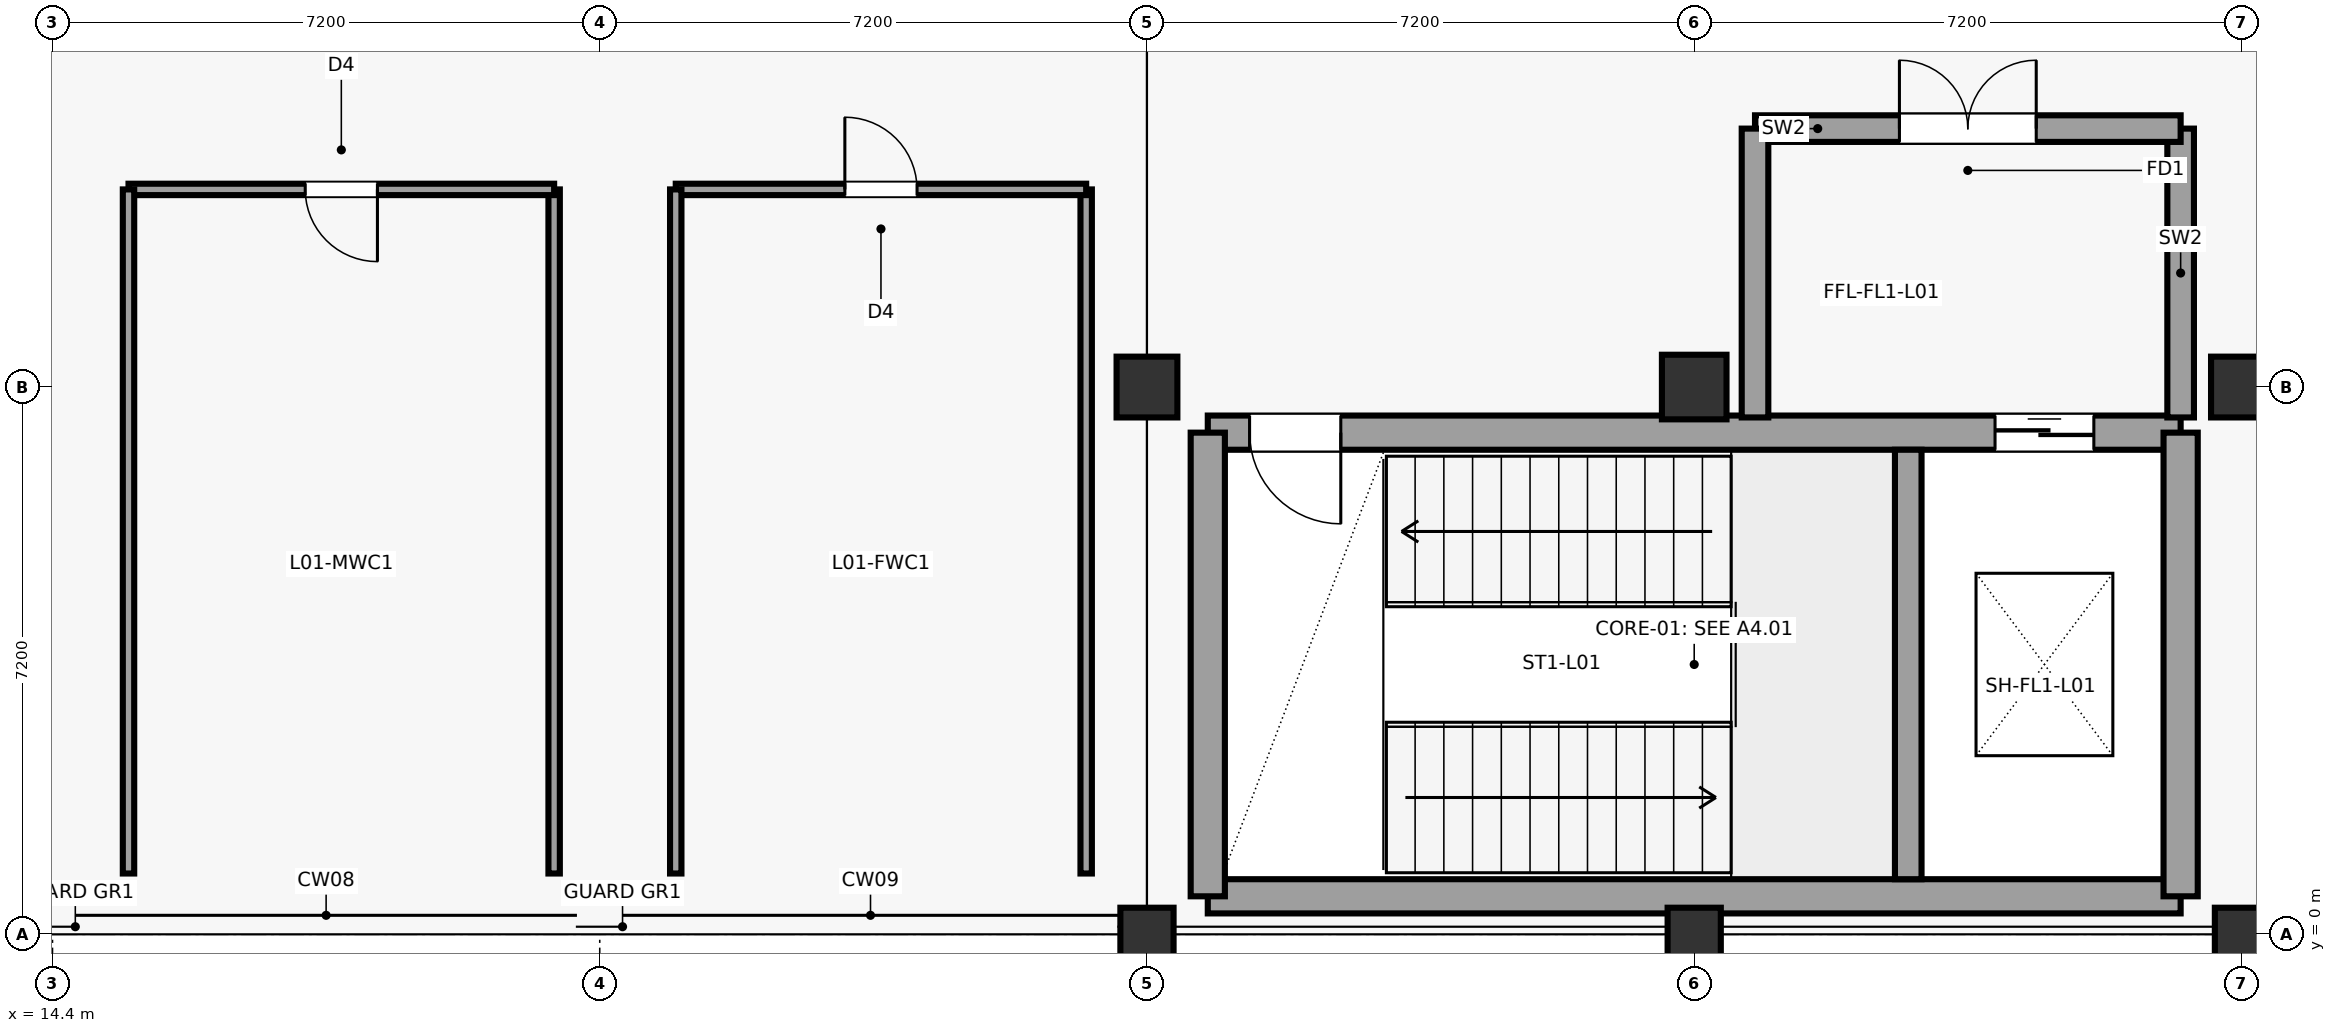
"""IFC4 building model, lengths in metres.
Left out: names, types, materials, properties, quantities, classifications, styles, units other than length and angle.
Written with IfcOpenShell. Run it as: python <this file> out.ifc"""

import sys

from ifc_helpers import new_model, si_unit, direction, frame, frame_2d, origin, origin_2d, place, context, subcontext, project, spatial, rectangle, circle, extrude, element, fill, save


model = new_model("IFC4")
c1 = context("Model", 3, precision=1e-05, world=origin(), true_north=direction((0.0, 1.0)))
c2 = subcontext(c1, "Body", "Model", "MODEL_VIEW")
j1 = project(units=[si_unit("LENGTHUNIT", "METRE"), si_unit("PLANEANGLEUNIT", "RADIAN")], contexts=[c1])
p1 = place(None, origin())
s1 = spatial("IfcSite", under=j1, at=p1, CompositionType="ELEMENT")
p2 = place(p1, origin())
s2 = spatial("IfcBuilding", under=s1, at=p2, CompositionType="ELEMENT")
p3 = place(p2, frame((0.0, 0.0, 5.4)))
s3 = spatial("IfcBuildingStorey", under=s2, at=p3, CompositionType="ELEMENT", Elevation=5.4)
p4 = place(p3, frame((28.8, 0.0, 0.0), z_axis=(0.0, 0.0, 1.0), x_axis=(1.0, 0.0, 0.0)))
e1 = element("IfcColumn", 1, at=p4, inside=s3, PredefinedType="COLUMN", context=c2, shape_type="SweptSolid", body=[
    extrude(rectangle(XDim=0.7, YDim=0.7, at=origin_2d()), origin(), (0.0, 0.0, 1.0), 4.2),
])
p5 = place(p3, frame((28.8, 7.2, 0.0), z_axis=(0.0, 0.0, 1.0), x_axis=(1.0, 0.0, 0.0)))
e2 = element("IfcColumn", 2, at=p5, inside=s3, PredefinedType="COLUMN", context=c2, shape_type="SweptSolid", body=[
    extrude(rectangle(XDim=0.8, YDim=0.8, at=origin_2d()), origin(), (0.0, 0.0, 1.0), 4.2),
])
p6 = place(p3, frame((36.0, 0.0, 0.0), z_axis=(0.0, 0.0, 1.0), x_axis=(1.0, 0.0, 0.0)))
e3 = element("IfcColumn", 3, at=p6, inside=s3, PredefinedType="COLUMN", context=c2, shape_type="SweptSolid", body=[
    extrude(rectangle(XDim=0.7, YDim=0.7, at=origin_2d()), origin(), (0.0, 0.0, 1.0), 4.2),
])
p7 = place(p3, frame((36.0, 7.2, 0.0), z_axis=(0.0, 0.0, 1.0), x_axis=(1.0, 0.0, 0.0)))
e4 = element("IfcColumn", 4, at=p7, inside=s3, PredefinedType="COLUMN", context=c2, shape_type="SweptSolid", body=[
    extrude(rectangle(XDim=0.85, YDim=0.85, at=origin_2d()), origin(), (0.0, 0.0, 1.0), 4.2),
])
p8 = place(p3, frame((43.2, 0.0, 0.0), z_axis=(0.0, 0.0, 1.0), x_axis=(1.0, 0.0, 0.0)))
e5 = element("IfcColumn", 5, at=p8, inside=s3, PredefinedType="COLUMN", context=c2, shape_type="SweptSolid", body=[
    extrude(rectangle(XDim=0.7, YDim=0.7, at=origin_2d()), origin(), (0.0, 0.0, 1.0), 4.2),
])
p9 = place(p3, frame((43.2, 7.2, 0.0), z_axis=(0.0, 0.0, 1.0), x_axis=(1.0, 0.0, 0.0)))
e6 = element("IfcColumn", 6, at=p9, inside=s3, PredefinedType="COLUMN", context=c2, shape_type="SweptSolid", body=[
    extrude(circle(Radius=0.4, at=origin_2d()), origin(), (0.0, 0.0, 1.0), 4.2),
])
p10 = place(p3, frame((29.6, 0.5, 0.0), z_axis=(0.0, 0.0, 1.0), x_axis=(1.0, 0.0, 0.0)))
e7 = element("IfcWall", 7, at=p10, inside=s3, PredefinedType="SHEAR", context=c2, shape_type="SweptSolid", body=[
    extrude(rectangle(XDim=12.8, YDim=0.45, at=frame_2d((6.4, 0.0))), origin(), (0.0, 0.0, 1.0), 3.92),
])
p11 = place(p3, frame((29.6, 6.6, 0.0), z_axis=(0.0, 0.0, 1.0), x_axis=(1.0, 0.0, 0.0)))
e8 = element("IfcWall", 8, at=p11, inside=s3, PredefinedType="SHEAR", context=c2, shape_type="SweptSolid", body=[
    extrude(rectangle(XDim=12.8, YDim=0.45, at=frame_2d((6.4, 0.0))), origin(), (0.0, 0.0, 1.0), 3.92),
])
p12 = place(p11, frame((0.55, 0.0, 0.0)))
e9 = element("IfcOpeningElement", 9, at=p12, cuts=e8, PredefinedType="OPENING", context=c2, shape_type="SweptSolid", body=[
    extrude(rectangle(XDim=1.2, YDim=2.25, at=frame_2d((0.6, 1.125))), frame((0.0, 0.235, 0.0), z_axis=(0.0, -1.0, 0.0), x_axis=(1.0, 0.0, 0.0)), (0.0, 0.0, 1.0), 0.47),
])
p13 = place(p11, frame((10.358, 0.0, 0.0)))
e10 = element("IfcOpeningElement", 10, at=p13, cuts=e8, PredefinedType="OPENING", context=c2, shape_type="SweptSolid", body=[
    extrude(rectangle(XDim=1.3, YDim=2.25, at=frame_2d((0.65, 1.125))), frame((0.0, 0.235, 0.0), z_axis=(0.0, -1.0, 0.0), x_axis=(1.0, 0.0, 0.0)), (0.0, 0.0, 1.0), 0.47),
])
for number, where, z_axis, x_axis in (
    (11, (29.6, 0.5, 0.0), (0.0, 0.0, 1.0), (0.0, 1.0, 0.0)),
    (12, (42.4, 0.5, 0.0), (0.0, 0.0, 1.0), (0.0, 1.0, 0.0)),
):
    element("IfcWall", number, at=place(p3, frame(where, z_axis=z_axis, x_axis=x_axis)), inside=s3, PredefinedType="SHEAR", context=c2, shape_type="SweptSolid", body=[
        extrude(rectangle(XDim=6.1, YDim=0.45, at=frame_2d((3.05, 0.0))), origin(), (0.0, 0.0, 1.0), 3.92),
    ])
p14 = place(p3, frame((38.816, 0.725, 0.0), z_axis=(0.0, 0.0, 1.0), x_axis=(0.0, 1.0, 0.0)))
e13 = element("IfcWall", 13, at=p14, inside=s3, PredefinedType="SHEAR", context=c2, shape_type="SweptSolid", body=[
    extrude(rectangle(XDim=5.65, YDim=0.35, at=frame_2d((2.825, 0.0))), origin(), (0.0, 0.0, 1.0), 3.92),
])
p15 = place(p3, frame((42.4, 6.8, 0.0), z_axis=(0.0, 0.0, 1.0), x_axis=(0.0, 1.0, 0.0)))
e14 = element("IfcWall", 14, at=p15, inside=s3, PredefinedType="SHEAR", context=c2, shape_type="SweptSolid", body=[
    extrude(rectangle(XDim=3.8, YDim=0.35, at=frame_2d((1.9, 0.0))), origin(), (0.0, 0.0, 1.0), 2.98),
])
p16 = place(p3, frame((42.4, 10.6, 0.0), z_axis=(0.0, 0.0, 1.0), x_axis=(-1.0, 0.0, 0.0)))
e15 = element("IfcWall", 15, at=p16, inside=s3, PredefinedType="SHEAR", context=c2, shape_type="SweptSolid", body=[
    extrude(rectangle(XDim=5.6, YDim=0.35, at=frame_2d((2.8, 0.0))), origin(), (0.0, 0.0, 1.0), 2.98),
])
p17 = place(p16, frame((1.9, 0.0, 0.0)))
e16 = element("IfcOpeningElement", 16, at=p17, cuts=e15, PredefinedType="OPENING", context=c2, shape_type="SweptSolid", body=[
    extrude(rectangle(XDim=1.8, YDim=2.3, at=frame_2d((0.9, 1.15))), frame((0.0, 0.185, 0.0), z_axis=(0.0, -1.0, 0.0), x_axis=(1.0, 0.0, 0.0)), (0.0, 0.0, 1.0), 0.37),
])
p18 = place(p3, frame((36.8, 10.6, 0.0), z_axis=(0.0, 0.0, 1.0), x_axis=(0.0, -1.0, 0.0)))
e17 = element("IfcWall", 17, at=p18, inside=s3, PredefinedType="SHEAR", context=c2, shape_type="SweptSolid", body=[
    extrude(rectangle(XDim=3.8, YDim=0.35, at=frame_2d((1.9, 0.0))), origin(), (0.0, 0.0, 1.0), 2.98),
])
p19 = place(p3, frame((21.0, 0.8, 0.0), z_axis=(0.0, 0.0, 1.0), x_axis=(0.0, 1.0, 0.0)))
e18 = element("IfcWall", 18, at=p19, inside=s3, PredefinedType="PARTITIONING", context=c2, shape_type="SweptSolid", body=[
    extrude(rectangle(XDim=9.0, YDim=0.15, at=frame_2d((4.5, 0.0))), origin(), (0.0, 0.0, 1.0), 2.98),
])
p20 = place(p3, frame((21.0, 9.8, 0.0), z_axis=(0.0, 0.0, 1.0), x_axis=(-1.0, 0.0, 0.0)))
e19 = element("IfcWall", 19, at=p20, inside=s3, PredefinedType="PARTITIONING", context=c2, shape_type="SweptSolid", body=[
    extrude(rectangle(XDim=5.6, YDim=0.15, at=frame_2d((2.8, 0.0))), origin(), (0.0, 0.0, 1.0), 2.98),
])
p21 = place(p20, frame((2.325, 0.0, 0.0)))
e20 = element("IfcOpeningElement", 20, at=p21, cuts=e19, PredefinedType="OPENING", context=c2, shape_type="SweptSolid", body=[
    extrude(rectangle(XDim=0.95, YDim=2.15, at=frame_2d((0.475, 1.075))), frame((0.0, 0.085, 0.0), z_axis=(0.0, -1.0, 0.0), x_axis=(1.0, 0.0, 0.0)), (0.0, 0.0, 1.0), 0.17),
])
for number, where, z_axis, x_axis in (
    (21, (15.4, 9.8, 0.0), (0.0, 0.0, 1.0), (0.0, -1.0, 0.0)),
    (22, (28.0, 0.8, 0.0), (0.0, 0.0, 1.0), (0.0, 1.0, 0.0)),
):
    element("IfcWall", number, at=place(p3, frame(where, z_axis=z_axis, x_axis=x_axis)), inside=s3, PredefinedType="PARTITIONING", context=c2, shape_type="SweptSolid", body=[
        extrude(rectangle(XDim=9.0, YDim=0.15, at=frame_2d((4.5, 0.0))), origin(), (0.0, 0.0, 1.0), 2.98),
    ])
p22 = place(p3, frame((28.0, 9.8, 0.0), z_axis=(0.0, 0.0, 1.0), x_axis=(-1.0, 0.0, 0.0)))
e23 = element("IfcWall", 23, at=p22, inside=s3, PredefinedType="PARTITIONING", context=c2, shape_type="SweptSolid", body=[
    extrude(rectangle(XDim=5.4, YDim=0.15, at=frame_2d((2.7, 0.0))), origin(), (0.0, 0.0, 1.0), 2.98),
])
p23 = place(p22, frame((2.225, 0.0, 0.0)))
e24 = element("IfcOpeningElement", 24, at=p23, cuts=e23, PredefinedType="OPENING", context=c2, shape_type="SweptSolid", body=[
    extrude(rectangle(XDim=0.95, YDim=2.15, at=frame_2d((0.475, 1.075))), frame((0.0, 0.085, 0.0), z_axis=(0.0, -1.0, 0.0), x_axis=(1.0, 0.0, 0.0)), (0.0, 0.0, 1.0), 0.17),
])
p24 = place(p3, frame((22.6, 9.8, 0.0), z_axis=(0.0, 0.0, 1.0), x_axis=(0.0, -1.0, 0.0)))
e25 = element("IfcWall", 25, at=p24, inside=s3, PredefinedType="PARTITIONING", context=c2, shape_type="SweptSolid", body=[
    extrude(rectangle(XDim=9.0, YDim=0.15, at=frame_2d((4.5, 0.0))), origin(), (0.0, 0.0, 1.0), 2.98),
])
p25 = place(p12, frame((1.2, 0.0, 0.0), z_axis=(0.0, 0.0, 1.0), x_axis=(-1.0, 0.0, 0.0)))
e26 = element("IfcDoor", 26, at=p25, inside=s3, OperationType="SINGLE_SWING_RIGHT", PredefinedType="DOOR", context=c2, shape_type="SweptSolid", body=[
    extrude(rectangle(XDim=1.2, YDim=2.25, at=frame_2d((0.6, 1.125))), frame((0.0, 0.025, 0.0), z_axis=(0.0, -1.0, 0.0), x_axis=(1.0, 0.0, 0.0)), (0.0, 0.0, 1.0), 0.05),
])
fill(e9, e26)
p26 = place(p13, origin())
e27 = element("IfcDoor", 27, at=p26, inside=s3, OperationType="SLIDING_TO_LEFT", PredefinedType="DOOR", context=c2, shape_type="SweptSolid", body=[
    extrude(rectangle(XDim=1.3, YDim=2.25, at=frame_2d((0.65, 1.125))), frame((0.0, 0.025, 0.0), z_axis=(0.0, -1.0, 0.0), x_axis=(1.0, 0.0, 0.0)), (0.0, 0.0, 1.0), 0.05),
])
fill(e10, e27)
p27 = place(p17, frame((1.8, 0.0, 0.0), z_axis=(0.0, 0.0, 1.0), x_axis=(-1.0, 0.0, 0.0)))
e28 = element("IfcDoor", 28, at=p27, inside=s3, OperationType="DOUBLE_DOOR_SINGLE_SWING", PredefinedType="DOOR", context=c2, shape_type="SweptSolid", body=[
    extrude(rectangle(XDim=1.8, YDim=2.3, at=frame_2d((0.9, 1.15))), frame((0.0, 0.025, 0.0), z_axis=(0.0, -1.0, 0.0), x_axis=(1.0, 0.0, 0.0)), (0.0, 0.0, 1.0), 0.05),
])
fill(e16, e28)
p28 = place(p21, origin())
e29 = element("IfcDoor", 29, at=p28, inside=s3, OperationType="SINGLE_SWING_LEFT", PredefinedType="DOOR", context=c2, shape_type="SweptSolid", body=[
    extrude(rectangle(XDim=0.95, YDim=2.15, at=frame_2d((0.475, 1.075))), frame((0.0, 0.025, 0.0), z_axis=(0.0, -1.0, 0.0), x_axis=(1.0, 0.0, 0.0)), (0.0, 0.0, 1.0), 0.05),
])
fill(e20, e29)
p29 = place(p23, frame((0.95, 0.0, 0.0), z_axis=(0.0, 0.0, 1.0), x_axis=(-1.0, 0.0, 0.0)))
e30 = element("IfcDoor", 30, at=p29, inside=s3, OperationType="SINGLE_SWING_RIGHT", PredefinedType="DOOR", context=c2, shape_type="SweptSolid", body=[
    extrude(rectangle(XDim=0.95, YDim=2.15, at=frame_2d((0.475, 1.075))), frame((0.0, 0.025, 0.0), z_axis=(0.0, -1.0, 0.0), x_axis=(1.0, 0.0, 0.0)), (0.0, 0.0, 1.0), 0.05),
])
fill(e24, e30)
save(model, sys.argv[1])
